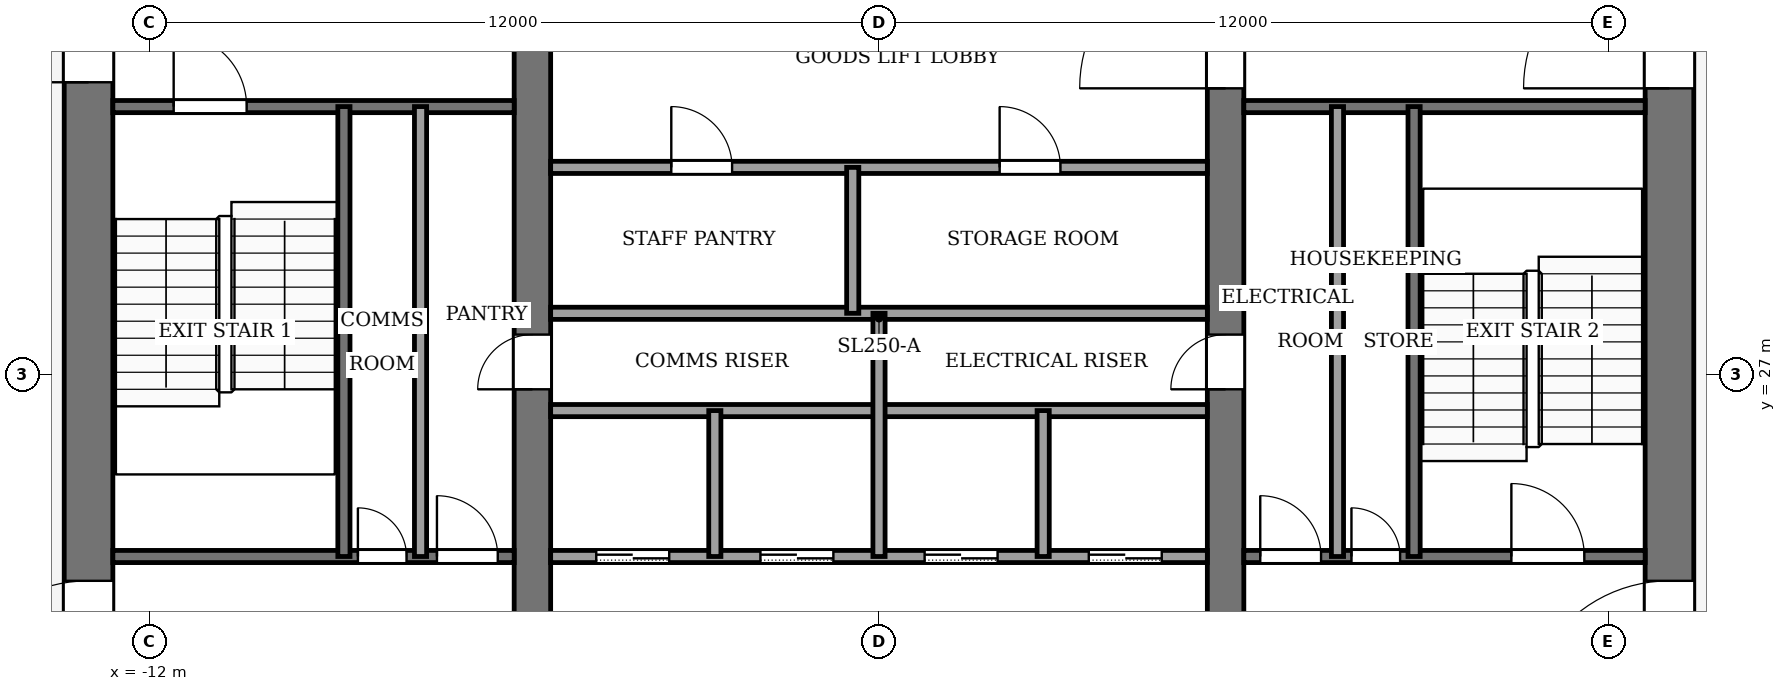
"""IFC4 building model, lengths in metres.
Left out: names, types, materials, properties, quantities, classifications, styles, units other than length and angle.
Written with IfcOpenShell. Run it as: python <this file> out.ifc"""

import sys

from ifc_helpers import new_model, si_unit, direction, frame, frame_2d, origin, place, context, subcontext, project, spatial, rectangle, extrude, element, fill, save


model = new_model("IFC4")
c1 = context("Model", 3, precision=1e-05, world=origin(), true_north=direction((0.0, 1.0)))
c2 = subcontext(c1, "Body", "Model", "MODEL_VIEW")
j1 = project(units=[si_unit("LENGTHUNIT", "METRE"), si_unit("PLANEANGLEUNIT", "RADIAN")], contexts=[c1])
p1 = place(None, origin())
s1 = spatial("IfcSite", under=j1, at=p1, CompositionType="ELEMENT")
p2 = place(p1, origin())
s2 = spatial("IfcBuilding", under=s1, at=p2, CompositionType="ELEMENT")
p3 = place(p2, frame((0.0, 0.0, 274.0)))
s3 = spatial("IfcBuildingStorey", under=s2, at=p3, CompositionType="ELEMENT", Elevation=274.0)
p4 = place(p3, frame((-13.0, 18.4, -0.13), z_axis=(0.0, 0.0, 1.0), x_axis=(0.0, 1.0, 0.0)))
e1 = element("IfcWall", 1, at=p4, inside=s3, PredefinedType="SHEAR", context=c2, shape_type="SweptSolid", body=[
    extrude(rectangle(XDim=19.2, YDim=0.8, at=frame_2d((9.6, 0.0))), origin(), (0.0, 0.0, 1.0), 4.0),
])
p5 = place(p4, frame((2.8, 0.0, 0.13)))
e2 = element("IfcOpeningElement", 2, at=p5, cuts=e1, PredefinedType="OPENING", context=c2, shape_type="SweptSolid", body=[
    extrude(rectangle(XDim=2.4, YDim=2.4, at=frame_2d((1.2, 1.2))), frame((0.0, 0.41, 0.0), z_axis=(0.0, -1.0, 0.0), x_axis=(1.0, 0.0, 0.0)), (0.0, 0.0, 1.0), 0.82),
])
p6 = place(p4, frame((13.4, 0.0, 0.13)))
e3 = element("IfcOpeningElement", 3, at=p6, cuts=e1, PredefinedType="OPENING", context=c2, shape_type="SweptSolid", body=[
    extrude(rectangle(XDim=1.4, YDim=2.2, at=frame_2d((0.7, 1.1))), frame((0.0, 0.41, 0.0), z_axis=(0.0, -1.0, 0.0), x_axis=(1.0, 0.0, 0.0)), (0.0, 0.0, 1.0), 0.82),
])
p7 = place(p3, frame((13.0, 18.4, -0.13), z_axis=(0.0, 0.0, 1.0), x_axis=(0.0, 1.0, 0.0)))
e4 = element("IfcWall", 4, at=p7, inside=s3, PredefinedType="SHEAR", context=c2, shape_type="SweptSolid", body=[
    extrude(rectangle(XDim=19.2, YDim=0.8, at=frame_2d((9.6, 0.0))), origin(), (0.0, 0.0, 1.0), 4.0),
])
p8 = place(p7, frame((2.8, 0.0, 0.13)))
e5 = element("IfcOpeningElement", 5, at=p8, cuts=e4, PredefinedType="OPENING", context=c2, shape_type="SweptSolid", body=[
    extrude(rectangle(XDim=2.4, YDim=2.4, at=frame_2d((1.2, 1.2))), frame((0.0, 0.41, 0.0), z_axis=(0.0, -1.0, 0.0), x_axis=(1.0, 0.0, 0.0)), (0.0, 0.0, 1.0), 0.82),
])
p9 = place(p7, frame((13.3, 0.0, 0.13)))
e6 = element("IfcOpeningElement", 6, at=p9, cuts=e4, PredefinedType="OPENING", context=c2, shape_type="SweptSolid", body=[
    extrude(rectangle(XDim=2.4, YDim=2.4, at=frame_2d((1.2, 1.2))), frame((0.0, 0.41, 0.0), z_axis=(0.0, -1.0, 0.0), x_axis=(1.0, 0.0, 0.0)), (0.0, 0.0, 1.0), 0.82),
])
p10 = place(p3, frame((-5.7, 18.4, -0.13), z_axis=(0.0, 0.0, 1.0), x_axis=(0.0, 1.0, 0.0)))
e7 = element("IfcWall", 7, at=p10, inside=s3, PredefinedType="SHEAR", context=c2, shape_type="SweptSolid", body=[
    extrude(rectangle(XDim=19.2, YDim=0.6, at=frame_2d((9.6, 0.0))), origin(), (0.0, 0.0, 1.0), 4.0),
])
p11 = place(p10, frame((8.35, 0.0, 0.13)))
e8 = element("IfcOpeningElement", 8, at=p11, cuts=e7, PredefinedType="OPENING", context=c2, shape_type="SweptSolid", body=[
    extrude(rectangle(XDim=0.9, YDim=2.1, at=frame_2d((0.45, 1.05))), frame((0.0, 0.31, 0.0), z_axis=(0.0, -1.0, 0.0), x_axis=(1.0, 0.0, 0.0)), (0.0, 0.0, 1.0), 0.62),
])
p12 = place(p3, frame((5.7, 18.4, -0.13), z_axis=(0.0, 0.0, 1.0), x_axis=(0.0, 1.0, 0.0)))
e9 = element("IfcWall", 9, at=p12, inside=s3, PredefinedType="SHEAR", context=c2, shape_type="SweptSolid", body=[
    extrude(rectangle(XDim=19.2, YDim=0.6, at=frame_2d((9.6, 0.0))), origin(), (0.0, 0.0, 1.0), 4.0),
])
p13 = place(p12, frame((8.35, 0.0, 0.13)))
e10 = element("IfcOpeningElement", 10, at=p13, cuts=e9, PredefinedType="OPENING", context=c2, shape_type="SweptSolid", body=[
    extrude(rectangle(XDim=0.9, YDim=2.1, at=frame_2d((0.45, 1.05))), frame((0.0, 0.31, 0.0), z_axis=(0.0, -1.0, 0.0), x_axis=(1.0, 0.0, 0.0)), (0.0, 0.0, 1.0), 0.62),
])
p14 = place(p12, frame((13.3, 0.0, 0.13)))
e11 = element("IfcOpeningElement", 11, at=p14, cuts=e9, PredefinedType="OPENING", context=c2, shape_type="SweptSolid", body=[
    extrude(rectangle(XDim=2.4, YDim=2.4, at=frame_2d((1.2, 1.2))), frame((0.0, 0.31, 0.0), z_axis=(0.0, -1.0, 0.0), x_axis=(1.0, 0.0, 0.0)), (0.0, 0.0, 1.0), 0.62),
])
p15 = place(p3, frame((-12.6, 24.0, 0.0), z_axis=(0.0, 0.0, 1.0), x_axis=(1.0, 0.0, 0.0)))
e12 = element("IfcWall", 12, at=p15, inside=s3, PredefinedType="PARTITIONING", context=c2, shape_type="SweptSolid", body=[
    extrude(rectangle(XDim=6.6, YDim=0.2, at=frame_2d((3.3, 0.0))), origin(), (0.0, 0.0, 1.0), 3.87),
])
p16 = place(p15, frame((4.03, 0.0, 0.0)))
e13 = element("IfcOpeningElement", 13, at=p16, cuts=e12, PredefinedType="OPENING", context=c2, shape_type="SweptSolid", body=[
    extrude(rectangle(XDim=0.8, YDim=2.1, at=frame_2d((0.4, 1.05))), frame((0.0, 0.11, 0.0), z_axis=(0.0, -1.0, 0.0), x_axis=(1.0, 0.0, 0.0)), (0.0, 0.0, 1.0), 0.22),
])
p17 = place(p15, frame((5.33, 0.0, 0.0)))
e14 = element("IfcOpeningElement", 14, at=p17, cuts=e12, PredefinedType="OPENING", context=c2, shape_type="SweptSolid", body=[
    extrude(rectangle(XDim=1.0, YDim=2.1, at=frame_2d((0.5, 1.05))), frame((0.0, 0.11, 0.0), z_axis=(0.0, -1.0, 0.0), x_axis=(1.0, 0.0, 0.0)), (0.0, 0.0, 1.0), 0.22),
])
p18 = place(p3, frame((-5.4, 24.0, 0.0), z_axis=(0.0, 0.0, 1.0), x_axis=(1.0, 0.0, 0.0)))
e15 = element("IfcWall", 15, at=p18, inside=s3, PredefinedType="PARTITIONING", context=c2, shape_type="SweptSolid", body=[
    extrude(rectangle(XDim=10.8, YDim=0.2, at=frame_2d((5.4, 0.0))), origin(), (0.0, 0.0, 1.0), 3.87),
])
p19 = place(p18, frame((0.75, 0.0, 0.0)))
e16 = element("IfcOpeningElement", 16, at=p19, cuts=e15, PredefinedType="OPENING", context=c2, shape_type="SweptSolid", body=[
    extrude(rectangle(XDim=1.2, YDim=2.2, at=frame_2d((0.6, 1.1))), frame((0.0, 0.11, 0.0), z_axis=(0.0, -1.0, 0.0), x_axis=(1.0, 0.0, 0.0)), (0.0, 0.0, 1.0), 0.22),
])
p20 = place(p18, frame((3.45, 0.0, 0.0)))
e17 = element("IfcOpeningElement", 17, at=p20, cuts=e15, PredefinedType="OPENING", context=c2, shape_type="SweptSolid", body=[
    extrude(rectangle(XDim=1.2, YDim=2.2, at=frame_2d((0.6, 1.1))), frame((0.0, 0.11, 0.0), z_axis=(0.0, -1.0, 0.0), x_axis=(1.0, 0.0, 0.0)), (0.0, 0.0, 1.0), 0.22),
])
p21 = place(p18, frame((6.15, 0.0, 0.0)))
e18 = element("IfcOpeningElement", 18, at=p21, cuts=e15, PredefinedType="OPENING", context=c2, shape_type="SweptSolid", body=[
    extrude(rectangle(XDim=1.2, YDim=2.2, at=frame_2d((0.6, 1.1))), frame((0.0, 0.11, 0.0), z_axis=(0.0, -1.0, 0.0), x_axis=(1.0, 0.0, 0.0)), (0.0, 0.0, 1.0), 0.22),
])
p22 = place(p18, frame((8.85, 0.0, 0.0)))
e19 = element("IfcOpeningElement", 19, at=p22, cuts=e15, PredefinedType="OPENING", context=c2, shape_type="SweptSolid", body=[
    extrude(rectangle(XDim=1.2, YDim=2.2, at=frame_2d((0.6, 1.1))), frame((0.0, 0.11, 0.0), z_axis=(0.0, -1.0, 0.0), x_axis=(1.0, 0.0, 0.0)), (0.0, 0.0, 1.0), 0.22),
])
p23 = place(p3, frame((6.0, 24.0, 0.0), z_axis=(0.0, 0.0, 1.0), x_axis=(1.0, 0.0, 0.0)))
e20 = element("IfcWall", 20, at=p23, inside=s3, PredefinedType="PARTITIONING", context=c2, shape_type="SweptSolid", body=[
    extrude(rectangle(XDim=6.6, YDim=0.2, at=frame_2d((3.3, 0.0))), origin(), (0.0, 0.0, 1.0), 3.87),
])
p24 = place(p23, frame((0.27, 0.0, 0.0)))
e21 = element("IfcOpeningElement", 21, at=p24, cuts=e20, PredefinedType="OPENING", context=c2, shape_type="SweptSolid", body=[
    extrude(rectangle(XDim=1.0, YDim=2.1, at=frame_2d((0.5, 1.05))), frame((0.0, 0.11, 0.0), z_axis=(0.0, -1.0, 0.0), x_axis=(1.0, 0.0, 0.0)), (0.0, 0.0, 1.0), 0.22),
])
p25 = place(p23, frame((1.77, 0.0, 0.0)))
e22 = element("IfcOpeningElement", 22, at=p25, cuts=e20, PredefinedType="OPENING", context=c2, shape_type="SweptSolid", body=[
    extrude(rectangle(XDim=0.8, YDim=2.1, at=frame_2d((0.4, 1.05))), frame((0.0, 0.11, 0.0), z_axis=(0.0, -1.0, 0.0), x_axis=(1.0, 0.0, 0.0)), (0.0, 0.0, 1.0), 0.22),
])
p26 = place(p23, frame((4.4, 0.0, 0.0)))
e23 = element("IfcOpeningElement", 23, at=p26, cuts=e20, PredefinedType="OPENING", context=c2, shape_type="SweptSolid", body=[
    extrude(rectangle(XDim=1.2, YDim=2.2, at=frame_2d((0.6, 1.1))), frame((0.0, 0.11, 0.0), z_axis=(0.0, -1.0, 0.0), x_axis=(1.0, 0.0, 0.0)), (0.0, 0.0, 1.0), 0.22),
])
for number, where, z_axis, x_axis in (
    (24, (-5.4, 26.4, 0.0), (0.0, 0.0, 1.0), (1.0, 0.0, 0.0)),
    (25, (-5.4, 28.0, 0.0), (0.0, 0.0, 1.0), (1.0, 0.0, 0.0)),
):
    element("IfcWall", number, at=place(p3, frame(where, z_axis=z_axis, x_axis=x_axis)), inside=s3, PredefinedType="PARTITIONING", context=c2, shape_type="SweptSolid", body=[
        extrude(rectangle(XDim=10.8, YDim=0.2, at=frame_2d((5.4, 0.0))), origin(), (0.0, 0.0, 1.0), 3.87),
    ])
p27 = place(p3, frame((-5.4, 30.4, 0.0), z_axis=(0.0, 0.0, 1.0), x_axis=(1.0, 0.0, 0.0)))
e26 = element("IfcWall", 26, at=p27, inside=s3, PredefinedType="PARTITIONING", context=c2, shape_type="SweptSolid", body=[
    extrude(rectangle(XDim=10.8, YDim=0.2, at=frame_2d((5.4, 0.0))), origin(), (0.0, 0.0, 1.0), 3.87),
])
p28 = place(p27, frame((1.984, 0.0, 0.0)))
e27 = element("IfcOpeningElement", 27, at=p28, cuts=e26, PredefinedType="OPENING", context=c2, shape_type="SweptSolid", body=[
    extrude(rectangle(XDim=1.0, YDim=2.1, at=frame_2d((0.5, 1.05))), frame((0.0, 0.11, 0.0), z_axis=(0.0, -1.0, 0.0), x_axis=(1.0, 0.0, 0.0)), (0.0, 0.0, 1.0), 0.22),
])
p29 = place(p27, frame((7.384, 0.0, 0.0)))
e28 = element("IfcOpeningElement", 28, at=p29, cuts=e26, PredefinedType="OPENING", context=c2, shape_type="SweptSolid", body=[
    extrude(rectangle(XDim=1.0, YDim=2.1, at=frame_2d((0.5, 1.05))), frame((0.0, 0.11, 0.0), z_axis=(0.0, -1.0, 0.0), x_axis=(1.0, 0.0, 0.0)), (0.0, 0.0, 1.0), 0.22),
])
p30 = place(p3, frame((-12.6, 31.4, 0.0), z_axis=(0.0, 0.0, 1.0), x_axis=(1.0, 0.0, 0.0)))
e29 = element("IfcWall", 29, at=p30, inside=s3, PredefinedType="PARTITIONING", context=c2, shape_type="SweptSolid", body=[
    extrude(rectangle(XDim=6.6, YDim=0.2, at=frame_2d((3.3, 0.0))), origin(), (0.0, 0.0, 1.0), 3.87),
])
p31 = place(p30, frame((1.0, 0.0, 0.0)))
e30 = element("IfcOpeningElement", 30, at=p31, cuts=e29, PredefinedType="OPENING", context=c2, shape_type="SweptSolid", body=[
    extrude(rectangle(XDim=1.2, YDim=2.2, at=frame_2d((0.6, 1.1))), frame((0.0, 0.11, 0.0), z_axis=(0.0, -1.0, 0.0), x_axis=(1.0, 0.0, 0.0)), (0.0, 0.0, 1.0), 0.22),
])
p32 = place(p3, frame((6.0, 31.4, 0.0), z_axis=(0.0, 0.0, 1.0), x_axis=(1.0, 0.0, 0.0)))
e31 = element("IfcWall", 31, at=p32, inside=s3, PredefinedType="PARTITIONING", context=c2, shape_type="SweptSolid", body=[
    extrude(rectangle(XDim=6.6, YDim=0.2, at=frame_2d((3.3, 0.0))), origin(), (0.0, 0.0, 1.0), 3.87),
])
for number, where, z_axis, x_axis in (
    (32, (-8.8, 24.0, 0.0), (0.0, 0.0, 1.0), (0.0, 1.0, 0.0)),
    (33, (-7.54, 24.0, 0.0), (0.0, 0.0, 1.0), (0.0, 1.0, 0.0)),
):
    element("IfcWall", number, at=place(p3, frame(where, z_axis=z_axis, x_axis=x_axis)), inside=s3, PredefinedType="PARTITIONING", context=c2, shape_type="SweptSolid", body=[
        extrude(rectangle(XDim=7.4, YDim=0.2, at=frame_2d((3.7, 0.0))), origin(), (0.0, 0.0, 1.0), 3.87),
    ])
for number, where, z_axis, x_axis in (
    (34, (-2.7, 24.0, 0.0), (0.0, 0.0, 1.0), (0.0, 1.0, 0.0)),
    (35, (-0.432, 28.0, 0.0), (0.0, 0.0, 1.0), (0.0, 1.0, 0.0)),
):
    element("IfcWall", number, at=place(p3, frame(where, z_axis=z_axis, x_axis=x_axis)), inside=s3, PredefinedType="PARTITIONING", context=c2, shape_type="SweptSolid", body=[
        extrude(rectangle(XDim=2.4, YDim=0.2, at=frame_2d((1.2, 0.0))), origin(), (0.0, 0.0, 1.0), 3.87),
    ])
p33 = place(p3, frame((0.0, 24.0, 0.0), z_axis=(0.0, 0.0, 1.0), x_axis=(0.0, 1.0, 0.0)))
e36 = element("IfcWall", 36, at=p33, inside=s3, PredefinedType="PARTITIONING", context=c2, shape_type="SweptSolid", body=[
    extrude(rectangle(XDim=4.0, YDim=0.2, at=frame_2d((2.0, 0.0))), origin(), (0.0, 0.0, 1.0), 3.87),
])
p34 = place(p3, frame((2.7, 24.0, 0.0), z_axis=(0.0, 0.0, 1.0), x_axis=(0.0, 1.0, 0.0)))
e37 = element("IfcWall", 37, at=p34, inside=s3, PredefinedType="PARTITIONING", context=c2, shape_type="SweptSolid", body=[
    extrude(rectangle(XDim=2.4, YDim=0.2, at=frame_2d((1.2, 0.0))), origin(), (0.0, 0.0, 1.0), 3.87),
])
for number, where, z_axis, x_axis in (
    (38, (7.54, 24.0, 0.0), (0.0, 0.0, 1.0), (0.0, 1.0, 0.0)),
    (39, (8.8, 24.0, 0.0), (0.0, 0.0, 1.0), (0.0, 1.0, 0.0)),
):
    element("IfcWall", number, at=place(p3, frame(where, z_axis=z_axis, x_axis=x_axis)), inside=s3, PredefinedType="PARTITIONING", context=c2, shape_type="SweptSolid", body=[
        extrude(rectangle(XDim=7.4, YDim=0.2, at=frame_2d((3.7, 0.0))), origin(), (0.0, 0.0, 1.0), 3.87),
    ])
p35 = place(p19, origin())
e40 = element("IfcDoor", 40, at=p35, inside=s3, OperationType="SLIDING_TO_LEFT", PredefinedType="DOOR", context=c2, shape_type="SweptSolid", body=[
    extrude(rectangle(XDim=1.2, YDim=2.2, at=frame_2d((0.6, 1.1))), frame((0.0, 0.025, 0.0), z_axis=(0.0, -1.0, 0.0), x_axis=(1.0, 0.0, 0.0)), (0.0, 0.0, 1.0), 0.05),
])
fill(e16, e40)
p36 = place(p20, origin())
e41 = element("IfcDoor", 41, at=p36, inside=s3, OperationType="SLIDING_TO_LEFT", PredefinedType="DOOR", context=c2, shape_type="SweptSolid", body=[
    extrude(rectangle(XDim=1.2, YDim=2.2, at=frame_2d((0.6, 1.1))), frame((0.0, 0.025, 0.0), z_axis=(0.0, -1.0, 0.0), x_axis=(1.0, 0.0, 0.0)), (0.0, 0.0, 1.0), 0.05),
])
fill(e17, e41)
p37 = place(p21, origin())
e42 = element("IfcDoor", 42, at=p37, inside=s3, OperationType="SLIDING_TO_LEFT", PredefinedType="DOOR", context=c2, shape_type="SweptSolid", body=[
    extrude(rectangle(XDim=1.2, YDim=2.2, at=frame_2d((0.6, 1.1))), frame((0.0, 0.025, 0.0), z_axis=(0.0, -1.0, 0.0), x_axis=(1.0, 0.0, 0.0)), (0.0, 0.0, 1.0), 0.05),
])
fill(e18, e42)
p38 = place(p22, origin())
e43 = element("IfcDoor", 43, at=p38, inside=s3, OperationType="SLIDING_TO_LEFT", PredefinedType="DOOR", context=c2, shape_type="SweptSolid", body=[
    extrude(rectangle(XDim=1.2, YDim=2.2, at=frame_2d((0.6, 1.1))), frame((0.0, 0.025, 0.0), z_axis=(0.0, -1.0, 0.0), x_axis=(1.0, 0.0, 0.0)), (0.0, 0.0, 1.0), 0.05),
])
fill(e19, e43)
p39 = place(p28, origin())
e44 = element("IfcDoor", 44, at=p39, inside=s3, OperationType="SINGLE_SWING_LEFT", PredefinedType="DOOR", context=c2, shape_type="SweptSolid", body=[
    extrude(rectangle(XDim=1.0, YDim=2.1, at=frame_2d((0.5, 1.05))), frame((0.0, 0.025, 0.0), z_axis=(0.0, -1.0, 0.0), x_axis=(1.0, 0.0, 0.0)), (0.0, 0.0, 1.0), 0.05),
])
fill(e27, e44)
p40 = place(p29, origin())
e45 = element("IfcDoor", 45, at=p40, inside=s3, OperationType="SINGLE_SWING_RIGHT", PredefinedType="DOOR", context=c2, shape_type="SweptSolid", body=[
    extrude(rectangle(XDim=1.0, YDim=2.1, at=frame_2d((0.5, 1.05))), frame((0.0, 0.025, 0.0), z_axis=(0.0, -1.0, 0.0), x_axis=(1.0, 0.0, 0.0)), (0.0, 0.0, 1.0), 0.05),
])
fill(e28, e45)
p41 = place(p16, origin())
e46 = element("IfcDoor", 46, at=p41, inside=s3, OperationType="SINGLE_SWING_RIGHT", PredefinedType="DOOR", context=c2, shape_type="SweptSolid", body=[
    extrude(rectangle(XDim=0.8, YDim=2.1, at=frame_2d((0.4, 1.05))), frame((0.0, 0.025, 0.0), z_axis=(0.0, -1.0, 0.0), x_axis=(1.0, 0.0, 0.0)), (0.0, 0.0, 1.0), 0.05),
])
fill(e13, e46)
p42 = place(p17, origin())
e47 = element("IfcDoor", 47, at=p42, inside=s3, OperationType="SINGLE_SWING_LEFT", PredefinedType="DOOR", context=c2, shape_type="SweptSolid", body=[
    extrude(rectangle(XDim=1.0, YDim=2.1, at=frame_2d((0.5, 1.05))), frame((0.0, 0.025, 0.0), z_axis=(0.0, -1.0, 0.0), x_axis=(1.0, 0.0, 0.0)), (0.0, 0.0, 1.0), 0.05),
])
fill(e14, e47)
p43 = place(p24, origin())
e48 = element("IfcDoor", 48, at=p43, inside=s3, OperationType="SINGLE_SWING_RIGHT", PredefinedType="DOOR", context=c2, shape_type="SweptSolid", body=[
    extrude(rectangle(XDim=1.0, YDim=2.1, at=frame_2d((0.5, 1.05))), frame((0.0, 0.025, 0.0), z_axis=(0.0, -1.0, 0.0), x_axis=(1.0, 0.0, 0.0)), (0.0, 0.0, 1.0), 0.05),
])
fill(e21, e48)
p44 = place(p25, origin())
e49 = element("IfcDoor", 49, at=p44, inside=s3, OperationType="SINGLE_SWING_LEFT", PredefinedType="DOOR", context=c2, shape_type="SweptSolid", body=[
    extrude(rectangle(XDim=0.8, YDim=2.1, at=frame_2d((0.4, 1.05))), frame((0.0, 0.025, 0.0), z_axis=(0.0, -1.0, 0.0), x_axis=(1.0, 0.0, 0.0)), (0.0, 0.0, 1.0), 0.05),
])
fill(e22, e49)
p45 = place(p11, origin())
e50 = element("IfcDoor", 50, at=p45, inside=s3, OperationType="SINGLE_SWING_RIGHT", PredefinedType="DOOR", context=c2, shape_type="SweptSolid", body=[
    extrude(rectangle(XDim=0.9, YDim=2.1, at=frame_2d((0.45, 1.05))), frame((0.0, 0.025, 0.0), z_axis=(0.0, -1.0, 0.0), x_axis=(1.0, 0.0, 0.0)), (0.0, 0.0, 1.0), 0.05),
])
fill(e8, e50)
p46 = place(p13, origin())
e51 = element("IfcDoor", 51, at=p46, inside=s3, OperationType="SINGLE_SWING_LEFT", PredefinedType="DOOR", context=c2, shape_type="SweptSolid", body=[
    extrude(rectangle(XDim=0.9, YDim=2.1, at=frame_2d((0.45, 1.05))), frame((0.0, 0.025, 0.0), z_axis=(0.0, -1.0, 0.0), x_axis=(1.0, 0.0, 0.0)), (0.0, 0.0, 1.0), 0.05),
])
fill(e10, e51)
p47 = place(p31, origin())
e52 = element("IfcDoor", 52, at=p47, inside=s3, OperationType="SINGLE_SWING_LEFT", PredefinedType="DOOR", context=c2, shape_type="SweptSolid", body=[
    extrude(rectangle(XDim=1.2, YDim=2.2, at=frame_2d((0.6, 1.1))), frame((0.0, 0.025, 0.0), z_axis=(0.0, -1.0, 0.0), x_axis=(1.0, 0.0, 0.0)), (0.0, 0.0, 1.0), 0.05),
])
fill(e30, e52)
p48 = place(p26, origin())
e53 = element("IfcDoor", 53, at=p48, inside=s3, OperationType="SINGLE_SWING_RIGHT", PredefinedType="DOOR", context=c2, shape_type="SweptSolid", body=[
    extrude(rectangle(XDim=1.2, YDim=2.2, at=frame_2d((0.6, 1.1))), frame((0.0, 0.025, 0.0), z_axis=(0.0, -1.0, 0.0), x_axis=(1.0, 0.0, 0.0)), (0.0, 0.0, 1.0), 0.05),
])
fill(e23, e53)
p49 = place(p14, origin())
e54 = element("IfcDoor", 54, at=p49, inside=s3, OperationType="DOUBLE_DOOR_SINGLE_SWING", PredefinedType="DOOR", context=c2, shape_type="SweptSolid", body=[
    extrude(rectangle(XDim=2.4, YDim=2.4, at=frame_2d((1.2, 1.2))), frame((0.0, 0.025, 0.0), z_axis=(0.0, -1.0, 0.0), x_axis=(1.0, 0.0, 0.0)), (0.0, 0.0, 1.0), 0.05),
])
fill(e11, e54)
p50 = place(p5, origin())
e55 = element("IfcDoor", 55, at=p50, inside=s3, OperationType="DOUBLE_DOOR_SINGLE_SWING", PredefinedType="DOOR", context=c2, shape_type="SweptSolid", body=[
    extrude(rectangle(XDim=2.4, YDim=2.4, at=frame_2d((1.2, 1.2))), frame((0.0, 0.025, 0.0), z_axis=(0.0, -1.0, 0.0), x_axis=(1.0, 0.0, 0.0)), (0.0, 0.0, 1.0), 0.05),
])
fill(e2, e55)
p51 = place(p8, origin())
e56 = element("IfcDoor", 56, at=p51, inside=s3, OperationType="DOUBLE_DOOR_SINGLE_SWING", PredefinedType="DOOR", context=c2, shape_type="SweptSolid", body=[
    extrude(rectangle(XDim=2.4, YDim=2.4, at=frame_2d((1.2, 1.2))), frame((0.0, 0.025, 0.0), z_axis=(0.0, -1.0, 0.0), x_axis=(1.0, 0.0, 0.0)), (0.0, 0.0, 1.0), 0.05),
])
fill(e5, e56)
p52 = place(p9, origin())
e57 = element("IfcDoor", 57, at=p52, inside=s3, OperationType="DOUBLE_DOOR_SINGLE_SWING", PredefinedType="DOOR", context=c2, shape_type="SweptSolid", body=[
    extrude(rectangle(XDim=2.4, YDim=2.4, at=frame_2d((1.2, 1.2))), frame((0.0, 0.025, 0.0), z_axis=(0.0, -1.0, 0.0), x_axis=(1.0, 0.0, 0.0)), (0.0, 0.0, 1.0), 0.05),
])
fill(e6, e57)
p53 = place(p6, origin())
e58 = element("IfcDoor", 58, at=p53, inside=s3, OperationType="SINGLE_SWING_LEFT", PredefinedType="DOOR", context=c2, shape_type="SweptSolid", body=[
    extrude(rectangle(XDim=1.4, YDim=2.2, at=frame_2d((0.7, 1.1))), frame((0.0, 0.025, 0.0), z_axis=(0.0, -1.0, 0.0), x_axis=(1.0, 0.0, 0.0)), (0.0, 0.0, 1.0), 0.05),
])
fill(e3, e58)
save(model, sys.argv[1])
